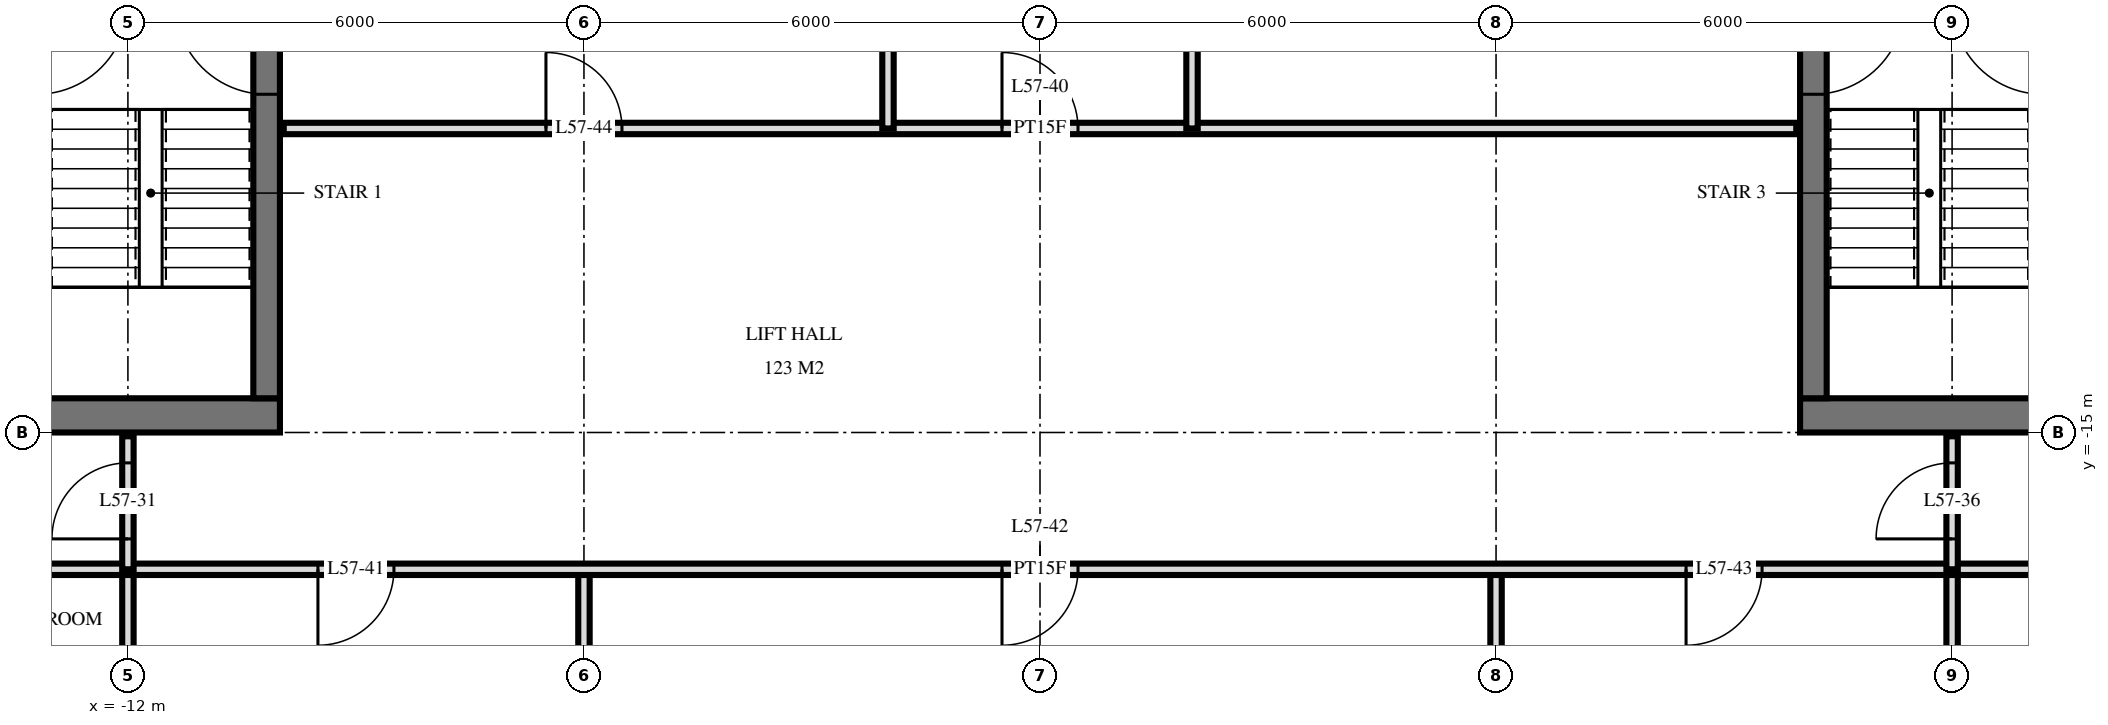
"""IFC4 building model, lengths in metres.
Left out: names, types, materials, properties, quantities, classifications, styles, units other than length and angle.
Written with IfcOpenShell. Run it as: python <this file> out.ifc"""

import sys

from ifc_helpers import new_model, si_unit, direction, frame, frame_2d, origin, place, context, subcontext, project, spatial, rectangle, extrude, element, fill, save


model = new_model("IFC4")
c1 = context("Model", 3, precision=1e-05, world=origin(), true_north=direction((0.0, 1.0)))
c2 = subcontext(c1, "Body", "Model", "MODEL_VIEW")
j1 = project(units=[si_unit("LENGTHUNIT", "METRE"), si_unit("PLANEANGLEUNIT", "RADIAN")], contexts=[c1])
p1 = place(None, origin())
s1 = spatial("IfcSite", under=j1, at=p1, CompositionType="ELEMENT")
p2 = place(p1, origin())
s2 = spatial("IfcBuilding", under=s1, at=p2, CompositionType="ELEMENT")
p3 = place(p2, frame((0.0, 0.0, 218.6)))
s3 = spatial("IfcBuildingStorey", under=s2, at=p3, CompositionType="ELEMENT", Elevation=218.6)
p4 = place(p3, frame((-24.5, -14.775, 0.0), z_axis=(0.0, 0.0, 1.0), x_axis=(1.0, 0.0, 0.0)))
e1 = element("IfcWall", 1, at=p4, inside=s3, PredefinedType="SHEAR", context=c2, shape_type="SweptSolid", body=[
    extrude(rectangle(XDim=14.5, YDim=0.45, at=frame_2d((7.25, 0.0))), origin(), (0.0, 0.0, 1.0), 3.5),
])
p5 = place(p4, frame((6.2, 0.0, 0.0)))
e2 = element("IfcOpeningElement", 2, at=p5, cuts=e1, PredefinedType="OPENING", context=c2, shape_type="SweptSolid", body=[
    extrude(rectangle(XDim=1.2, YDim=2.1, at=frame_2d((0.6, 1.05))), frame((0.0, 0.235, 0.0), z_axis=(0.0, -1.0, 0.0), x_axis=(1.0, 0.0, 0.0)), (0.0, 0.0, 1.0), 0.47),
])
p6 = place(p4, frame((9.25, 0.0, 0.0)))
e3 = element("IfcOpeningElement", 3, at=p6, cuts=e1, PredefinedType="OPENING", context=c2, shape_type="SweptSolid", body=[
    extrude(rectangle(XDim=1.1, YDim=2.1, at=frame_2d((0.55, 1.05))), frame((0.0, 0.235, 0.0), z_axis=(0.0, -1.0, 0.0), x_axis=(1.0, 0.0, 0.0)), (0.0, 0.0, 1.0), 0.47),
])
p7 = place(p4, frame((3.5, 0.0, 0.0)))
e4 = element("IfcOpeningElement", 4, at=p7, cuts=e1, PredefinedType="OPENING", context=c2, shape_type="SweptSolid", body=[
    extrude(rectangle(XDim=0.9, YDim=2.1, at=frame_2d((0.45, 1.05))), frame((0.0, 0.235, 0.0), z_axis=(0.0, -1.0, 0.0), x_axis=(1.0, 0.0, 0.0)), (0.0, 0.0, 1.0), 0.47),
])
p8 = place(p4, frame((1.05, 0.0, 0.0)))
e5 = element("IfcOpeningElement", 5, at=p8, cuts=e1, PredefinedType="OPENING", context=c2, shape_type="SweptSolid", body=[
    extrude(rectangle(XDim=1.0, YDim=2.1, at=frame_2d((0.5, 1.05))), frame((0.0, 0.235, 0.0), z_axis=(0.0, -1.0, 0.0), x_axis=(1.0, 0.0, 0.0)), (0.0, 0.0, 1.0), 0.47),
])
p9 = place(p3, frame((-10.175, -14.55, 0.0), z_axis=(0.0, 0.0, 1.0), x_axis=(0.0, 1.0, 0.0)))
e6 = element("IfcWall", 6, at=p9, inside=s3, PredefinedType="SHEAR", context=c2, shape_type="SweptSolid", body=[
    extrude(rectangle(XDim=14.1, YDim=0.35, at=frame_2d((7.05, 0.0))), origin(), (0.0, 0.0, 1.0), 3.5),
])
p10 = place(p9, frame((8.4, 0.0, 0.0)))
e7 = element("IfcOpeningElement", 7, at=p10, cuts=e6, PredefinedType="OPENING", context=c2, shape_type="SweptSolid", body=[
    extrude(rectangle(XDim=1.4, YDim=2.4, at=frame_2d((0.7, 1.2))), frame((0.0, 0.185, 0.0), z_axis=(0.0, -1.0, 0.0), x_axis=(1.0, 0.0, 0.0)), (0.0, 0.0, 1.0), 0.37),
])
p11 = place(p9, frame((10.0, 0.0, 0.0)))
e8 = element("IfcOpeningElement", 8, at=p11, cuts=e6, PredefinedType="OPENING", context=c2, shape_type="SweptSolid", body=[
    extrude(rectangle(XDim=1.4, YDim=2.4, at=frame_2d((0.7, 1.2))), frame((0.0, 0.185, 0.0), z_axis=(0.0, -1.0, 0.0), x_axis=(1.0, 0.0, 0.0)), (0.0, 0.0, 1.0), 0.37),
])
p12 = place(p9, frame((4.0, 0.0, 0.0)))
e9 = element("IfcOpeningElement", 9, at=p12, cuts=e6, PredefinedType="OPENING", context=c2, shape_type="SweptSolid", body=[
    extrude(rectangle(XDim=1.2, YDim=2.1, at=frame_2d((0.6, 1.05))), frame((0.0, 0.185, 0.0), z_axis=(0.0, -1.0, 0.0), x_axis=(1.0, 0.0, 0.0)), (0.0, 0.0, 1.0), 0.37),
])
p13 = place(p3, frame((10.0, -14.775, 0.0), z_axis=(0.0, 0.0, 1.0), x_axis=(1.0, 0.0, 0.0)))
e10 = element("IfcWall", 10, at=p13, inside=s3, PredefinedType="SHEAR", context=c2, shape_type="SweptSolid", body=[
    extrude(rectangle(XDim=14.5, YDim=0.45, at=frame_2d((7.25, 0.0))), origin(), (0.0, 0.0, 1.0), 3.5),
])
p14 = place(p13, frame((7.1, 0.0, 0.0)))
e11 = element("IfcOpeningElement", 11, at=p14, cuts=e10, PredefinedType="OPENING", context=c2, shape_type="SweptSolid", body=[
    extrude(rectangle(XDim=1.2, YDim=2.1, at=frame_2d((0.6, 1.05))), frame((0.0, 0.235, 0.0), z_axis=(0.0, -1.0, 0.0), x_axis=(1.0, 0.0, 0.0)), (0.0, 0.0, 1.0), 0.47),
])
p15 = place(p13, frame((4.15, 0.0, 0.0)))
e12 = element("IfcOpeningElement", 12, at=p15, cuts=e10, PredefinedType="OPENING", context=c2, shape_type="SweptSolid", body=[
    extrude(rectangle(XDim=1.1, YDim=2.1, at=frame_2d((0.55, 1.05))), frame((0.0, 0.235, 0.0), z_axis=(0.0, -1.0, 0.0), x_axis=(1.0, 0.0, 0.0)), (0.0, 0.0, 1.0), 0.47),
])
p16 = place(p13, frame((10.1, 0.0, 0.0)))
e13 = element("IfcOpeningElement", 13, at=p16, cuts=e10, PredefinedType="OPENING", context=c2, shape_type="SweptSolid", body=[
    extrude(rectangle(XDim=0.9, YDim=2.1, at=frame_2d((0.45, 1.05))), frame((0.0, 0.235, 0.0), z_axis=(0.0, -1.0, 0.0), x_axis=(1.0, 0.0, 0.0)), (0.0, 0.0, 1.0), 0.47),
])
p17 = place(p13, frame((12.45, 0.0, 0.0)))
e14 = element("IfcOpeningElement", 14, at=p17, cuts=e10, PredefinedType="OPENING", context=c2, shape_type="SweptSolid", body=[
    extrude(rectangle(XDim=1.0, YDim=2.1, at=frame_2d((0.5, 1.05))), frame((0.0, 0.235, 0.0), z_axis=(0.0, -1.0, 0.0), x_axis=(1.0, 0.0, 0.0)), (0.0, 0.0, 1.0), 0.47),
])
p18 = place(p3, frame((10.175, -14.55, 0.0), z_axis=(0.0, 0.0, 1.0), x_axis=(0.0, 1.0, 0.0)))
e15 = element("IfcWall", 15, at=p18, inside=s3, PredefinedType="SHEAR", context=c2, shape_type="SweptSolid", body=[
    extrude(rectangle(XDim=14.1, YDim=0.35, at=frame_2d((7.05, 0.0))), origin(), (0.0, 0.0, 1.0), 3.5),
])
p19 = place(p18, frame((8.4, 0.0, 0.0)))
e16 = element("IfcOpeningElement", 16, at=p19, cuts=e15, PredefinedType="OPENING", context=c2, shape_type="SweptSolid", body=[
    extrude(rectangle(XDim=1.4, YDim=2.4, at=frame_2d((0.7, 1.2))), frame((0.0, 0.185, 0.0), z_axis=(0.0, -1.0, 0.0), x_axis=(1.0, 0.0, 0.0)), (0.0, 0.0, 1.0), 0.37),
])
p20 = place(p18, frame((10.0, 0.0, 0.0)))
e17 = element("IfcOpeningElement", 17, at=p20, cuts=e15, PredefinedType="OPENING", context=c2, shape_type="SweptSolid", body=[
    extrude(rectangle(XDim=1.4, YDim=2.4, at=frame_2d((0.7, 1.2))), frame((0.0, 0.185, 0.0), z_axis=(0.0, -1.0, 0.0), x_axis=(1.0, 0.0, 0.0)), (0.0, 0.0, 1.0), 0.37),
])
p21 = place(p18, frame((4.0, 0.0, 0.0)))
e18 = element("IfcOpeningElement", 18, at=p21, cuts=e15, PredefinedType="OPENING", context=c2, shape_type="SweptSolid", body=[
    extrude(rectangle(XDim=1.2, YDim=2.1, at=frame_2d((0.6, 1.05))), frame((0.0, 0.185, 0.0), z_axis=(0.0, -1.0, 0.0), x_axis=(1.0, 0.0, 0.0)), (0.0, 0.0, 1.0), 0.37),
])
p22 = place(p3, frame((12.0, -16.8, 0.0), z_axis=(0.0, 0.0, 1.0), x_axis=(0.0, 1.0, 0.0)))
e19 = element("IfcWall", 19, at=p22, inside=s3, PredefinedType="PARTITIONING", context=c2, shape_type="SweptSolid", body=[
    extrude(rectangle(XDim=1.75, YDim=0.15, at=frame_2d((0.875, 0.0))), origin(), (0.0, 0.0, 1.0), 3.22),
])
p23 = place(p22, frame((0.4, 0.0, 0.0)))
e20 = element("IfcOpeningElement", 20, at=p23, cuts=e19, PredefinedType="OPENING", context=c2, shape_type="SweptSolid", body=[
    extrude(rectangle(XDim=1.0, YDim=2.1, at=frame_2d((0.5, 1.05))), frame((0.0, 0.085, 0.0), z_axis=(0.0, -1.0, 0.0), x_axis=(1.0, 0.0, 0.0)), (0.0, 0.0, 1.0), 0.17),
])
for number, where, z_axis, x_axis in (
    (21, (12.0, -29.22, 0.0), (0.0, 0.0, 1.0), (0.0, 1.0, 0.0)),
    (22, (6.0, -29.22, 0.0), (0.0, 0.0, 1.0), (0.0, 1.0, 0.0)),
):
    element("IfcWall", number, at=place(p3, frame(where, z_axis=z_axis, x_axis=x_axis)), inside=s3, PredefinedType="PARTITIONING", context=c2, shape_type="SweptSolid", body=[
        extrude(rectangle(XDim=12.42, YDim=0.15, at=frame_2d((6.21, 0.0))), origin(), (0.0, 0.0, 1.0), 3.22),
    ])
for number, where, z_axis, x_axis in (
    (23, (2.0, -11.0, 0.0), (0.0, 0.0, 1.0), (0.0, 1.0, 0.0)),
    (24, (-2.0, -11.0, 0.0), (0.0, 0.0, 1.0), (0.0, 1.0, 0.0)),
):
    element("IfcWall", number, at=place(p3, frame(where, z_axis=z_axis, x_axis=x_axis)), inside=s3, PredefinedType="PARTITIONING", context=c2, shape_type="SweptSolid", body=[
        extrude(rectangle(XDim=4.0, YDim=0.15, at=frame_2d((2.0, 0.0))), origin(), (0.0, 0.0, 1.0), 3.22),
    ])
p24 = place(p3, frame((-6.0, -29.22, 0.0), z_axis=(0.0, 0.0, 1.0), x_axis=(0.0, 1.0, 0.0)))
e25 = element("IfcWall", 25, at=p24, inside=s3, PredefinedType="PARTITIONING", context=c2, shape_type="SweptSolid", body=[
    extrude(rectangle(XDim=12.42, YDim=0.15, at=frame_2d((6.21, 0.0))), origin(), (0.0, 0.0, 1.0), 3.22),
])
p25 = place(p3, frame((-12.0, -16.8, 0.0), z_axis=(0.0, 0.0, 1.0), x_axis=(0.0, 1.0, 0.0)))
e26 = element("IfcWall", 26, at=p25, inside=s3, PredefinedType="PARTITIONING", context=c2, shape_type="SweptSolid", body=[
    extrude(rectangle(XDim=1.75, YDim=0.15, at=frame_2d((0.875, 0.0))), origin(), (0.0, 0.0, 1.0), 3.22),
])
p26 = place(p25, frame((0.4, 0.0, 0.0)))
e27 = element("IfcOpeningElement", 27, at=p26, cuts=e26, PredefinedType="OPENING", context=c2, shape_type="SweptSolid", body=[
    extrude(rectangle(XDim=1.0, YDim=2.1, at=frame_2d((0.5, 1.05))), frame((0.0, 0.085, 0.0), z_axis=(0.0, -1.0, 0.0), x_axis=(1.0, 0.0, 0.0)), (0.0, 0.0, 1.0), 0.17),
])
p27 = place(p3, frame((-12.0, -29.22, 0.0), z_axis=(0.0, 0.0, 1.0), x_axis=(0.0, 1.0, 0.0)))
e28 = element("IfcWall", 28, at=p27, inside=s3, PredefinedType="PARTITIONING", context=c2, shape_type="SweptSolid", body=[
    extrude(rectangle(XDim=12.42, YDim=0.15, at=frame_2d((6.21, 0.0))), origin(), (0.0, 0.0, 1.0), 3.22),
])
p28 = place(p3, frame((-26.82, -16.8, 0.0), z_axis=(0.0, 0.0, 1.0), x_axis=(1.0, 0.0, 0.0)))
e29 = element("IfcWall", 29, at=p28, inside=s3, PredefinedType="PARTITIONING", context=c2, shape_type="SweptSolid", body=[
    extrude(rectangle(XDim=53.64, YDim=0.15, at=frame_2d((26.82, 0.0))), origin(), (0.0, 0.0, 1.0), 3.22),
])
p29 = place(p28, frame((11.17, 0.0, 0.0)))
e30 = element("IfcOpeningElement", 30, at=p29, cuts=e29, PredefinedType="OPENING", context=c2, shape_type="SweptSolid", body=[
    extrude(rectangle(XDim=1.0, YDim=2.1, at=frame_2d((0.5, 1.05))), frame((0.0, 0.085, 0.0), z_axis=(0.0, -1.0, 0.0), x_axis=(1.0, 0.0, 0.0)), (0.0, 0.0, 1.0), 0.17),
])
p30 = place(p28, frame((3.22, 0.0, 0.0)))
e31 = element("IfcOpeningElement", 31, at=p30, cuts=e29, PredefinedType="OPENING", context=c2, shape_type="SweptSolid", body=[
    extrude(rectangle(XDim=1.0, YDim=2.1, at=frame_2d((0.5, 1.05))), frame((0.0, 0.085, 0.0), z_axis=(0.0, -1.0, 0.0), x_axis=(1.0, 0.0, 0.0)), (0.0, 0.0, 1.0), 0.17),
])
p31 = place(p28, frame((5.02, 0.0, 0.0)))
e32 = element("IfcOpeningElement", 32, at=p31, cuts=e29, PredefinedType="OPENING", context=c2, shape_type="SweptSolid", body=[
    extrude(rectangle(XDim=1.0, YDim=2.1, at=frame_2d((0.5, 1.05))), frame((0.0, 0.085, 0.0), z_axis=(0.0, -1.0, 0.0), x_axis=(1.0, 0.0, 0.0)), (0.0, 0.0, 1.0), 0.17),
])
p32 = place(p28, frame((47.72, 0.0, 0.0)))
e33 = element("IfcOpeningElement", 33, at=p32, cuts=e29, PredefinedType="OPENING", context=c2, shape_type="SweptSolid", body=[
    extrude(rectangle(XDim=1.0, YDim=2.1, at=frame_2d((0.5, 1.05))), frame((0.0, 0.085, 0.0), z_axis=(0.0, -1.0, 0.0), x_axis=(1.0, 0.0, 0.0)), (0.0, 0.0, 1.0), 0.17),
])
p33 = place(p28, frame((51.04, 0.0, 0.0)))
e34 = element("IfcOpeningElement", 34, at=p33, cuts=e29, PredefinedType="OPENING", context=c2, shape_type="SweptSolid", body=[
    extrude(rectangle(XDim=1.0, YDim=2.1, at=frame_2d((0.5, 1.05))), frame((0.0, 0.085, 0.0), z_axis=(0.0, -1.0, 0.0), x_axis=(1.0, 0.0, 0.0)), (0.0, 0.0, 1.0), 0.17),
])
p34 = place(p28, frame((17.32, 0.0, 0.0)))
e35 = element("IfcOpeningElement", 35, at=p34, cuts=e29, PredefinedType="OPENING", context=c2, shape_type="SweptSolid", body=[
    extrude(rectangle(XDim=1.0, YDim=2.1, at=frame_2d((0.5, 1.05))), frame((0.0, 0.085, 0.0), z_axis=(0.0, -1.0, 0.0), x_axis=(1.0, 0.0, 0.0)), (0.0, 0.0, 1.0), 0.17),
])
p35 = place(p28, frame((26.32, 0.0, 0.0)))
e36 = element("IfcOpeningElement", 36, at=p35, cuts=e29, PredefinedType="OPENING", context=c2, shape_type="SweptSolid", body=[
    extrude(rectangle(XDim=1.0, YDim=2.1, at=frame_2d((0.5, 1.05))), frame((0.0, 0.085, 0.0), z_axis=(0.0, -1.0, 0.0), x_axis=(1.0, 0.0, 0.0)), (0.0, 0.0, 1.0), 0.17),
])
p36 = place(p28, frame((35.32, 0.0, 0.0)))
e37 = element("IfcOpeningElement", 37, at=p36, cuts=e29, PredefinedType="OPENING", context=c2, shape_type="SweptSolid", body=[
    extrude(rectangle(XDim=1.0, YDim=2.1, at=frame_2d((0.5, 1.05))), frame((0.0, 0.085, 0.0), z_axis=(0.0, -1.0, 0.0), x_axis=(1.0, 0.0, 0.0)), (0.0, 0.0, 1.0), 0.17),
])
p37 = place(p3, frame((-9.95, -11.0, 0.0), z_axis=(0.0, 0.0, 1.0), x_axis=(1.0, 0.0, 0.0)))
e38 = element("IfcWall", 38, at=p37, inside=s3, PredefinedType="PARTITIONING", context=c2, shape_type="SweptSolid", body=[
    extrude(rectangle(XDim=19.9, YDim=0.15, at=frame_2d((9.95, 0.0))), origin(), (0.0, 0.0, 1.0), 3.22),
])
p38 = place(p37, frame((9.45, 0.0, 0.0)))
e39 = element("IfcOpeningElement", 39, at=p38, cuts=e38, PredefinedType="OPENING", context=c2, shape_type="SweptSolid", body=[
    extrude(rectangle(XDim=1.0, YDim=2.1, at=frame_2d((0.5, 1.05))), frame((0.0, 0.085, 0.0), z_axis=(0.0, -1.0, 0.0), x_axis=(1.0, 0.0, 0.0)), (0.0, 0.0, 1.0), 0.17),
])
p39 = place(p37, frame((3.45, 0.0, 0.0)))
e40 = element("IfcOpeningElement", 40, at=p39, cuts=e38, PredefinedType="OPENING", context=c2, shape_type="SweptSolid", body=[
    extrude(rectangle(XDim=1.0, YDim=2.1, at=frame_2d((0.5, 1.05))), frame((0.0, 0.085, 0.0), z_axis=(0.0, -1.0, 0.0), x_axis=(1.0, 0.0, 0.0)), (0.0, 0.0, 1.0), 0.17),
])
p40 = place(p12, origin())
e41 = element("IfcDoor", 41, at=p40, inside=s3, OperationType="SINGLE_SWING_LEFT", PredefinedType="DOOR", context=c2, shape_type="SweptSolid", body=[
    extrude(rectangle(XDim=1.2, YDim=2.1, at=frame_2d((0.6, 1.05))), frame((0.0, 0.025, 0.0), z_axis=(0.0, -1.0, 0.0), x_axis=(1.0, 0.0, 0.0)), (0.0, 0.0, 1.0), 0.05),
])
fill(e9, e41)
p41 = place(p21, frame((0.6, 0.0, 0.0), z_axis=(0.0, 0.0, 1.0), x_axis=(-1.0, 0.0, 0.0)))
e42 = element("IfcDoor", 42, at=p41, inside=s3, OperationType="SINGLE_SWING_RIGHT", PredefinedType="DOOR", context=c2, shape_type="SweptSolid", body=[
    extrude(rectangle(XDim=1.2, YDim=2.1, at=frame_2d((0.0, 1.05))), frame((0.0, -0.025, 0.0), z_axis=(0.0, 1.0, 0.0), x_axis=(-1.0, 0.0, 0.0)), (0.0, 0.0, 1.0), 0.05),
])
fill(e18, e42)
p42 = place(p26, origin())
e43 = element("IfcDoor", 43, at=p42, inside=s3, OperationType="SINGLE_SWING_RIGHT", PredefinedType="DOOR", context=c2, shape_type="SweptSolid", body=[
    extrude(rectangle(XDim=1.0, YDim=2.1, at=frame_2d((0.5, 1.05))), frame((0.0, 0.025, 0.0), z_axis=(0.0, -1.0, 0.0), x_axis=(1.0, 0.0, 0.0)), (0.0, 0.0, 1.0), 0.05),
])
fill(e27, e43)
p43 = place(p23, origin())
e44 = element("IfcDoor", 44, at=p43, inside=s3, OperationType="SINGLE_SWING_RIGHT", PredefinedType="DOOR", context=c2, shape_type="SweptSolid", body=[
    extrude(rectangle(XDim=1.0, YDim=2.1, at=frame_2d((0.5, 1.05))), frame((0.0, 0.025, 0.0), z_axis=(0.0, -1.0, 0.0), x_axis=(1.0, 0.0, 0.0)), (0.0, 0.0, 1.0), 0.05),
])
fill(e20, e44)
p44 = place(p38, origin())
e45 = element("IfcDoor", 45, at=p44, inside=s3, OperationType="SINGLE_SWING_RIGHT", PredefinedType="DOOR", context=c2, shape_type="SweptSolid", body=[
    extrude(rectangle(XDim=1.0, YDim=2.1, at=frame_2d((0.5, 1.05))), frame((0.0, 0.025, 0.0), z_axis=(0.0, -1.0, 0.0), x_axis=(1.0, 0.0, 0.0)), (0.0, 0.0, 1.0), 0.05),
])
fill(e39, e45)
p45 = place(p34, frame((0.5, 0.0, 0.0), z_axis=(0.0, 0.0, 1.0), x_axis=(-1.0, 0.0, 0.0)))
e46 = element("IfcDoor", 46, at=p45, inside=s3, OperationType="SINGLE_SWING_LEFT", PredefinedType="DOOR", context=c2, shape_type="SweptSolid", body=[
    extrude(rectangle(XDim=1.0, YDim=2.1, at=frame_2d((0.0, 1.05))), frame((0.0, -0.025, 0.0), z_axis=(0.0, 1.0, 0.0), x_axis=(-1.0, 0.0, 0.0)), (0.0, 0.0, 1.0), 0.05),
])
fill(e35, e46)
p46 = place(p35, frame((0.5, 0.0, 0.0), z_axis=(0.0, 0.0, 1.0), x_axis=(-1.0, 0.0, 0.0)))
e47 = element("IfcDoor", 47, at=p46, inside=s3, OperationType="SINGLE_SWING_LEFT", PredefinedType="DOOR", context=c2, shape_type="SweptSolid", body=[
    extrude(rectangle(XDim=1.0, YDim=2.1, at=frame_2d((0.0, 1.05))), frame((0.0, -0.025, 0.0), z_axis=(0.0, 1.0, 0.0), x_axis=(-1.0, 0.0, 0.0)), (0.0, 0.0, 1.0), 0.05),
])
fill(e36, e47)
p47 = place(p36, frame((0.5, 0.0, 0.0), z_axis=(0.0, 0.0, 1.0), x_axis=(-1.0, 0.0, 0.0)))
e48 = element("IfcDoor", 48, at=p47, inside=s3, OperationType="SINGLE_SWING_LEFT", PredefinedType="DOOR", context=c2, shape_type="SweptSolid", body=[
    extrude(rectangle(XDim=1.0, YDim=2.1, at=frame_2d((0.0, 1.05))), frame((0.0, -0.025, 0.0), z_axis=(0.0, 1.0, 0.0), x_axis=(-1.0, 0.0, 0.0)), (0.0, 0.0, 1.0), 0.05),
])
fill(e37, e48)
p48 = place(p39, origin())
e49 = element("IfcDoor", 49, at=p48, inside=s3, OperationType="SINGLE_SWING_RIGHT", PredefinedType="DOOR", context=c2, shape_type="SweptSolid", body=[
    extrude(rectangle(XDim=1.0, YDim=2.1, at=frame_2d((0.5, 1.05))), frame((0.0, 0.025, 0.0), z_axis=(0.0, -1.0, 0.0), x_axis=(1.0, 0.0, 0.0)), (0.0, 0.0, 1.0), 0.05),
])
fill(e40, e49)
save(model, sys.argv[1])
